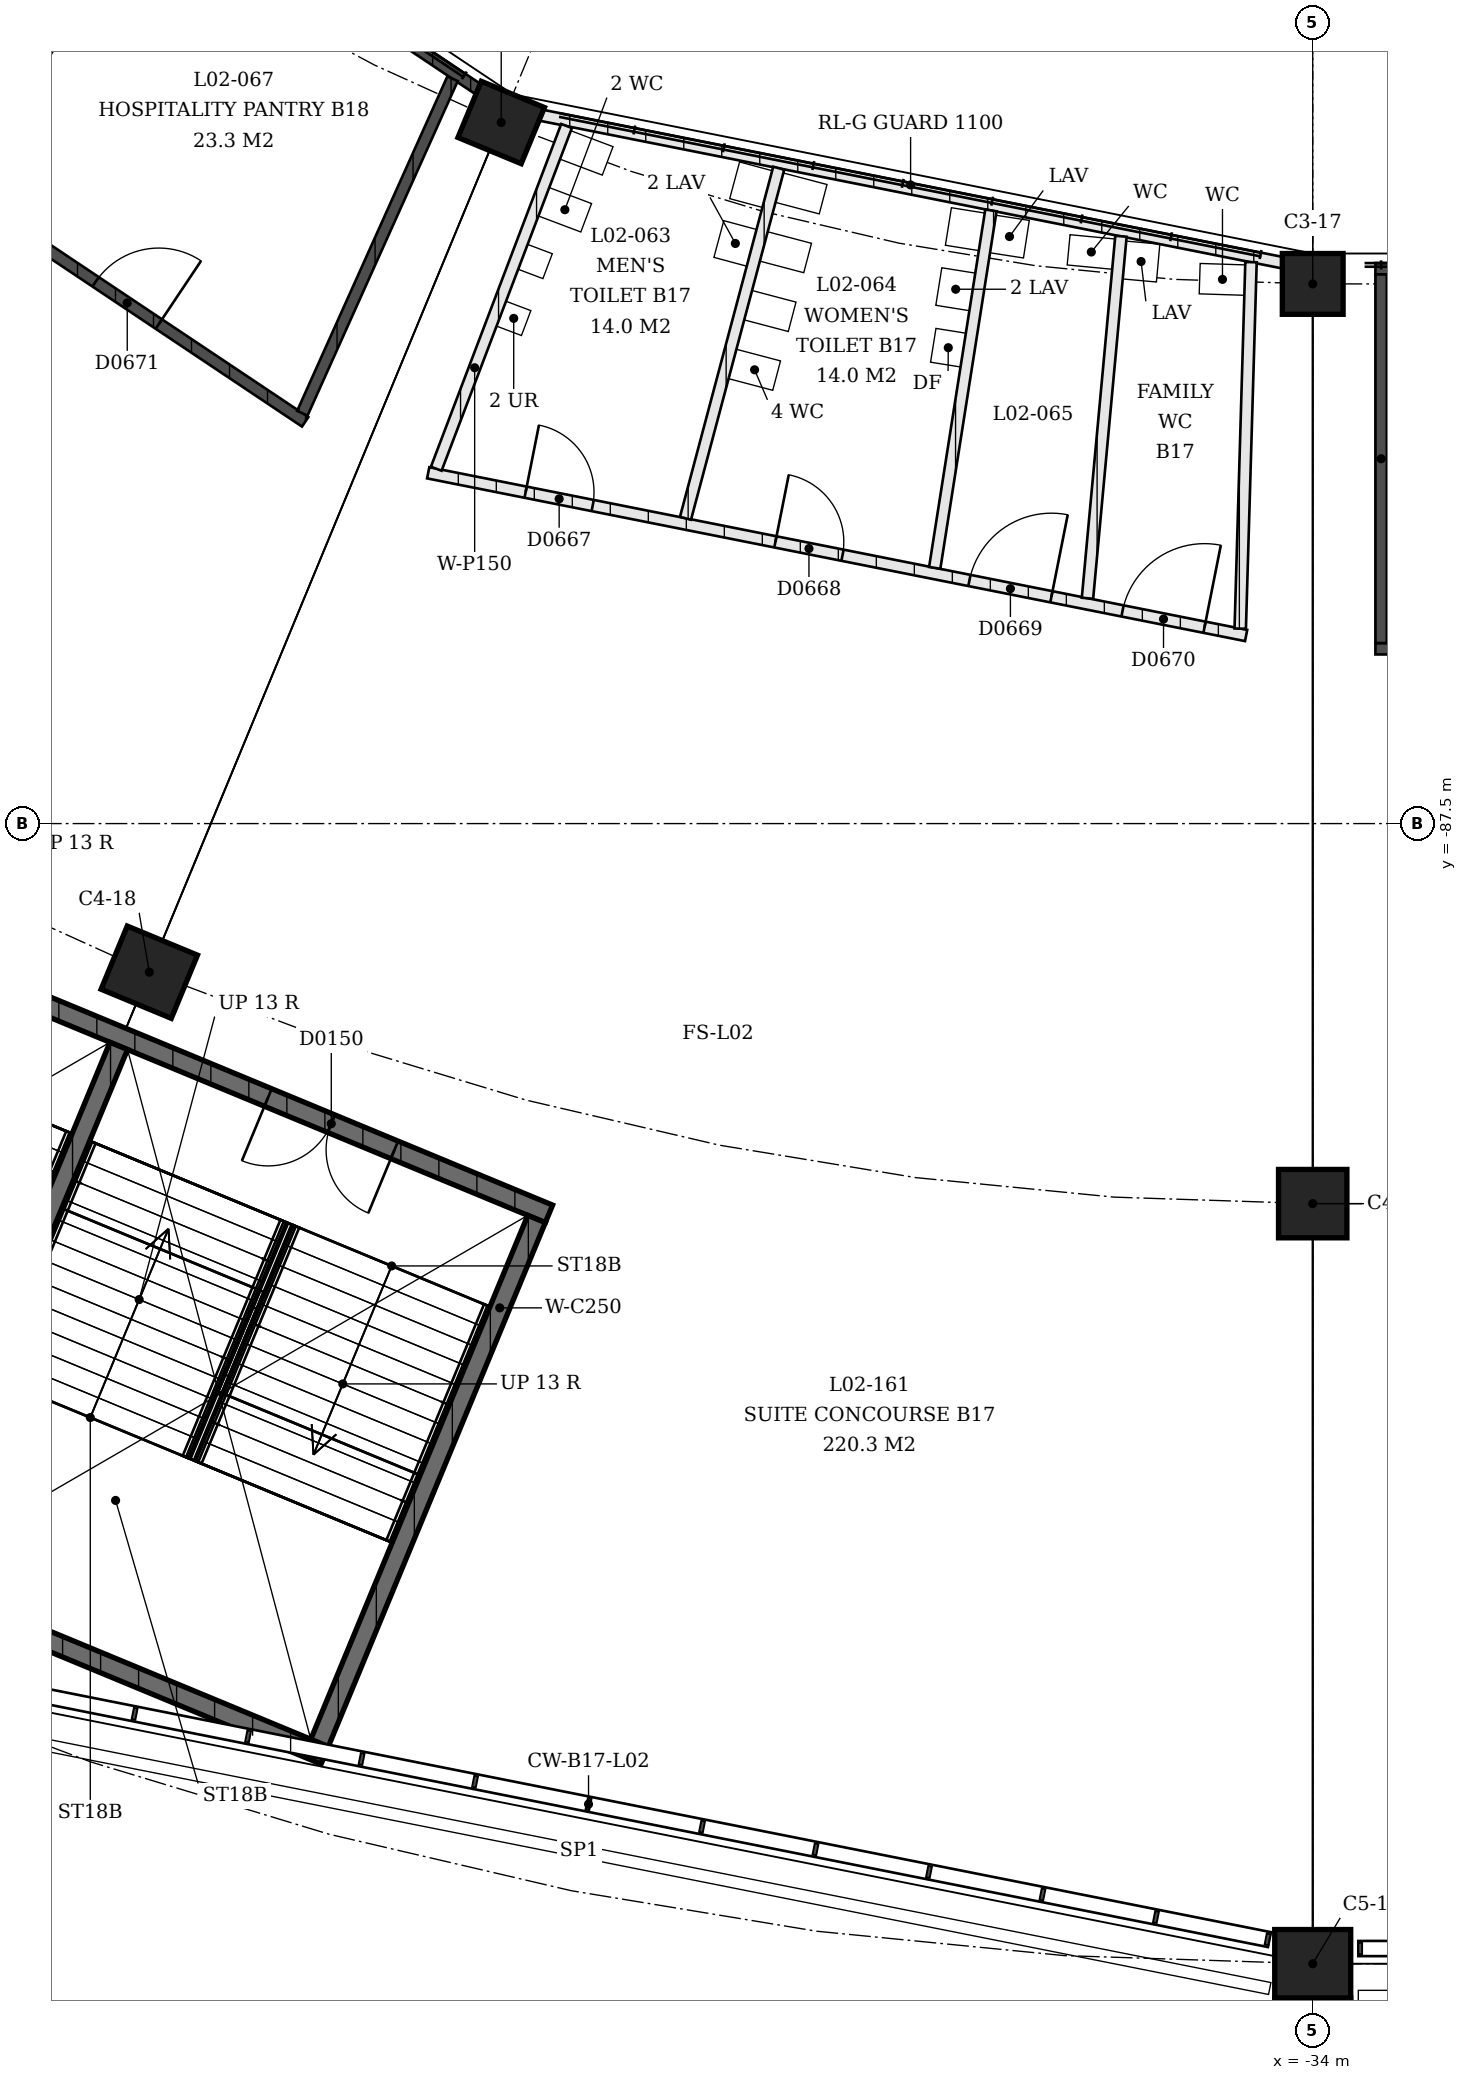
"""IFC4 building model, lengths in metres.
Left out: names, types, materials, properties, quantities, classifications, styles, units other than length and angle.
Written with IfcOpenShell. Run it as: python <this file> out.ifc"""

import sys

from ifc_helpers import new_model, si_unit, direction, frame, frame_2d, origin, origin_2d, place, context, subcontext, project, spatial, rectangle, extrude, element, fill, save


model = new_model("IFC4")
c1 = context("Model", 3, precision=1e-05, world=origin(), true_north=direction((0.0, 1.0)))
c2 = subcontext(c1, "Body", "Model", "MODEL_VIEW")
j1 = project(units=[si_unit("LENGTHUNIT", "METRE"), si_unit("PLANEANGLEUNIT", "RADIAN")], contexts=[c1])
p1 = place(None, origin())
s1 = spatial("IfcSite", under=j1, at=p1, CompositionType="ELEMENT")
p2 = place(p1, origin())
s2 = spatial("IfcBuilding", under=s1, at=p2, CompositionType="ELEMENT")
p3 = place(p2, frame((0.0, 0.0, 9.0)))
s3 = spatial("IfcBuildingStorey", under=s2, at=p3, CompositionType="ELEMENT", Elevation=9.0)
p4 = place(p3, frame((-34.0, -80.4, 0.0), z_axis=(0.0, 0.0, 1.0), x_axis=(1.0, 0.0, 0.0)))
e1 = element("IfcColumn", 1, at=p4, inside=s3, PredefinedType="COLUMN", context=c2, shape_type="SweptSolid", body=[
    extrude(rectangle(XDim=0.8, YDim=0.8, at=origin_2d()), origin(), (0.0, 0.0, 1.0), 4.5),
])
p5 = place(p3, frame((-34.0, -92.5, 0.0), z_axis=(0.0, 0.0, 1.0), x_axis=(1.0, 0.0, 0.0)))
e2 = element("IfcColumn", 2, at=p5, inside=s3, PredefinedType="COLUMN", context=c2, shape_type="SweptSolid", body=[
    extrude(rectangle(XDim=0.9, YDim=0.9, at=origin_2d()), origin(), (0.0, 0.0, 1.0), 4.5),
])
p6 = place(p3, frame((-34.0, -102.5, 0.0), z_axis=(0.0, 0.0, 1.0), x_axis=(1.0, 0.0, 0.0)))
e3 = element("IfcColumn", 3, at=p6, inside=s3, PredefinedType="COLUMN", context=c2, shape_type="SweptSolid", body=[
    extrude(rectangle(XDim=1.0, YDim=0.9, at=origin_2d()), origin(), (0.0, 0.0, 1.0), 4.5),
])
p7 = place(p3, frame((-44.677, -78.276, 0.0), z_axis=(0.0, 0.0, 1.0), x_axis=(0.923879532511, -0.382683432365, 0.0)))
e4 = element("IfcColumn", 4, at=p7, inside=s3, PredefinedType="COLUMN", context=c2, shape_type="SweptSolid", body=[
    extrude(rectangle(XDim=0.9, YDim=0.8, at=origin_2d()), origin(), (0.0, 0.0, 1.0), 4.5),
])
p8 = place(p3, frame((-49.307, -89.455, 0.0), z_axis=(0.0, 0.0, 1.0), x_axis=(0.923879532511, -0.382683432365, 0.0)))
e5 = element("IfcColumn", 5, at=p8, inside=s3, PredefinedType="COLUMN", context=c2, shape_type="SweptSolid", body=[
    extrude(rectangle(XDim=1.0, YDim=0.9, at=origin_2d()), origin(), (0.0, 0.0, 1.0), 4.5),
])
p9 = place(p3, frame((-55.274, -87.985, 0.0), z_axis=(0.0, 0.0, 1.0), x_axis=(0.923877480578, -0.382688386133, 0.0)))
e6 = element("IfcWall", 6, at=p9, inside=s3, PredefinedType="SHEAR", context=c2, shape_type="SweptSolid", body=[
    extrude(rectangle(XDim=12.15, YDim=0.25, at=frame_2d((6.075, 0.0))), origin(), (0.0, 0.0, 1.0), 4.09),
])
p10 = place(p9, frame((2.2, 0.0, 0.0)))
e7 = element("IfcOpeningElement", 7, at=p10, cuts=e6, PredefinedType="OPENING", context=c2, shape_type="SweptSolid", body=[
    extrude(rectangle(XDim=1.8, YDim=2.1, at=frame_2d((0.9, 1.05))), frame((0.0, 0.125, 0.0), z_axis=(0.0, -1.0, 0.0), x_axis=(1.0, 0.0, 0.0)), (0.0, 0.0, 1.0), 0.25),
])
p11 = place(p9, frame((8.15, 0.0, 0.0)))
e8 = element("IfcOpeningElement", 8, at=p11, cuts=e6, PredefinedType="OPENING", context=c2, shape_type="SweptSolid", body=[
    extrude(rectangle(XDim=1.8, YDim=2.1, at=frame_2d((0.9, 1.05))), frame((0.0, 0.125, 0.0), z_axis=(0.0, -1.0, 0.0), x_axis=(1.0, 0.0, 0.0)), (0.0, 0.0, 1.0), 0.25),
])
p12 = place(p3, frame((-58.224, -95.108, 0.0), z_axis=(0.0, 0.0, 1.0), x_axis=(0.923884584817, -0.382671234792, 0.0)))
e9 = element("IfcWall", 9, at=p12, inside=s3, PredefinedType="SHEAR", context=c2, shape_type="SweptSolid", body=[
    extrude(rectangle(XDim=12.15, YDim=0.25, at=frame_2d((6.075, 0.0))), origin(), (0.0, 0.0, 1.0), 4.09),
])
p13 = place(p3, frame((-44.212, -92.702, 0.0), z_axis=(0.0, 0.0, 1.0), x_axis=(-0.382664910245, -0.923887204407, 0.0)))
e10 = element("IfcWall", 10, at=p13, inside=s3, PredefinedType="SHEAR", context=c2, shape_type="SweptSolid", body=[
    extrude(rectangle(XDim=7.46, YDim=0.25, at=frame_2d((3.73, 0.0))), origin(), (0.0, 0.0, 1.0), 4.09),
])
p14 = place(p3, frame((-49.709, -90.425, 0.0), z_axis=(0.0, 0.0, 1.0), x_axis=(-0.382676480483, -0.923882412044, 0.0)))
e11 = element("IfcWall", 11, at=p14, inside=s3, PredefinedType="SHEAR", context=c2, shape_type="SweptSolid", body=[
    extrude(rectangle(XDim=7.46, YDim=0.25, at=frame_2d((3.73, 0.0))), origin(), (0.0, 0.0, 1.0), 4.09),
])
p15 = place(p3, frame((-20.9, -80.2, 0.0), z_axis=(0.0, 0.0, 1.0), x_axis=(-1.0, 0.0, 0.0)))
e12 = element("IfcWall", 12, at=p15, inside=s3, PredefinedType="SOLIDWALL", context=c2, shape_type="SweptSolid", body=[
    extrude(rectangle(XDim=12.275, YDim=0.15, at=frame_2d((6.138, 0.0))), origin(), (0.0, 0.0, 1.0), 3.0),
])
p16 = place(p3, frame((-21.225, -85.2, 0.0), z_axis=(0.0, 0.0, 1.0), x_axis=(-1.0, 0.0, 0.0)))
e13 = element("IfcWall", 13, at=p16, inside=s3, PredefinedType="SOLIDWALL", context=c2, shape_type="SweptSolid", body=[
    extrude(rectangle(XDim=11.95, YDim=0.15, at=frame_2d((5.975, 0.0))), origin(), (0.0, 0.0, 1.0), 3.0),
])
p17 = place(p16, frame((2.525, 0.0, 0.0)))
e14 = element("IfcOpeningElement", 14, at=p17, cuts=e13, PredefinedType="OPENING", context=c2, shape_type="SweptSolid", body=[
    extrude(rectangle(XDim=1.0, YDim=2.1, at=frame_2d((0.5, 1.05))), frame((0.0, 0.075, 0.0), z_axis=(0.0, -1.0, 0.0), x_axis=(1.0, 0.0, 0.0)), (0.0, 0.0, 1.0), 0.15),
])
p18 = place(p16, frame((8.425, 0.0, 0.0)))
e15 = element("IfcOpeningElement", 15, at=p18, cuts=e13, PredefinedType="OPENING", context=c2, shape_type="SweptSolid", body=[
    extrude(rectangle(XDim=1.0, YDim=2.1, at=frame_2d((0.5, 1.05))), frame((0.0, 0.075, 0.0), z_axis=(0.0, -1.0, 0.0), x_axis=(1.0, 0.0, 0.0)), (0.0, 0.0, 1.0), 0.15),
])
p19 = place(p3, frame((-33.1, -80.275, 0.0), z_axis=(0.0, 0.0, 1.0), x_axis=(0.0, -1.0, 0.0)))
e16 = element("IfcWall", 16, at=p19, inside=s3, PredefinedType="SOLIDWALL", context=c2, shape_type="SweptSolid", body=[
    extrude(rectangle(XDim=4.85, YDim=0.15, at=frame_2d((2.425, 0.0))), origin(), (0.0, 0.0, 1.0), 3.0),
])
p20 = place(p3, frame((-44.15, -78.181, 0.0), z_axis=(0.0, 0.0, 1.0), x_axis=(0.980786042223, -0.195086492048, 0.0)))
e17 = element("IfcWall", 17, at=p20, inside=s3, PredefinedType="PARTITIONING", context=c2, shape_type="SweptSolid", body=[
    extrude(rectangle(XDim=9.941, YDim=0.15, at=frame_2d((4.971, 0.0))), origin(), (0.0, 0.0, 1.0), 3.0),
])
p21 = place(p3, frame((-45.638, -82.885, 0.0), z_axis=(0.0, 0.0, 1.0), x_axis=(0.980788934186, -0.195071952313, 0.0)))
e18 = element("IfcWall", 18, at=p21, inside=s3, PredefinedType="PARTITIONING", context=c2, shape_type="SweptSolid", body=[
    extrude(rectangle(XDim=10.972, YDim=0.15, at=frame_2d((5.486, 0.0))), origin(), (0.0, 0.0, 1.0), 3.0),
])
p22 = place(p21, frame((1.307, 0.0, 0.0)))
e19 = element("IfcOpeningElement", 19, at=p22, cuts=e18, PredefinedType="OPENING", context=c2, shape_type="SweptSolid", body=[
    extrude(rectangle(XDim=0.9, YDim=2.1, at=frame_2d((0.45, 1.05))), frame((0.0, 0.075, 0.0), z_axis=(0.0, -1.0, 0.0), x_axis=(1.0, 0.0, 0.0)), (0.0, 0.0, 1.0), 0.15),
])
p23 = place(p21, frame((4.658, 0.0, 0.0)))
e20 = element("IfcOpeningElement", 20, at=p23, cuts=e18, PredefinedType="OPENING", context=c2, shape_type="SweptSolid", body=[
    extrude(rectangle(XDim=0.9, YDim=2.1, at=frame_2d((0.45, 1.05))), frame((0.0, 0.075, 0.0), z_axis=(0.0, -1.0, 0.0), x_axis=(1.0, 0.0, 0.0)), (0.0, 0.0, 1.0), 0.15),
])
p24 = place(p21, frame((7.26, 0.0, 0.0)))
e21 = element("IfcOpeningElement", 21, at=p24, cuts=e18, PredefinedType="OPENING", context=c2, shape_type="SweptSolid", body=[
    extrude(rectangle(XDim=1.1, YDim=2.1, at=frame_2d((0.55, 1.05))), frame((0.0, 0.075, 0.0), z_axis=(0.0, -1.0, 0.0), x_axis=(1.0, 0.0, 0.0)), (0.0, 0.0, 1.0), 0.15),
])
p25 = place(p21, frame((9.314, 0.0, 0.0)))
e22 = element("IfcOpeningElement", 22, at=p25, cuts=e18, PredefinedType="OPENING", context=c2, shape_type="SweptSolid", body=[
    extrude(rectangle(XDim=1.1, YDim=2.1, at=frame_2d((0.55, 1.05))), frame((0.0, 0.075, 0.0), z_axis=(0.0, -1.0, 0.0), x_axis=(1.0, 0.0, 0.0)), (0.0, 0.0, 1.0), 0.15),
])
p26 = place(p3, frame((-43.817, -78.322, 0.0), z_axis=(0.0, 0.0, 1.0), x_axis=(-0.35538492255, -0.934720041951, 0.0)))
e23 = element("IfcWall", 23, at=p26, inside=s3, PredefinedType="PARTITIONING", context=c2, shape_type="SweptSolid", body=[
    extrude(rectangle(XDim=4.824, YDim=0.15, at=frame_2d((2.412, 0.0))), origin(), (0.0, 0.0, 1.0), 3.0),
])
p27 = place(p3, frame((-41.026, -78.877, 0.0), z_axis=(0.0, 0.0, 1.0), x_axis=(-0.257378912157, -0.966310558556, 0.0)))
e24 = element("IfcWall", 24, at=p27, inside=s3, PredefinedType="PARTITIONING", context=c2, shape_type="SweptSolid", body=[
    extrude(rectangle(XDim=4.767, YDim=0.15, at=frame_2d((2.383, 0.0))), origin(), (0.0, 0.0, 1.0), 3.0),
])
p28 = place(p3, frame((-38.234, -79.433, 0.0), z_axis=(0.0, 0.0, 1.0), x_axis=(-0.155285736325, -0.987869596705, 0.0)))
e25 = element("IfcWall", 25, at=p28, inside=s3, PredefinedType="PARTITIONING", context=c2, shape_type="SweptSolid", body=[
    extrude(rectangle(XDim=4.761, YDim=0.15, at=frame_2d((2.38, 0.0))), origin(), (0.0, 0.0, 1.0), 3.0),
])
p29 = place(p3, frame((-36.523, -79.773, 0.0), z_axis=(0.0, 0.0, 1.0), x_axis=(-0.09208667632, -0.995750995, 0.0)))
e26 = element("IfcWall", 26, at=p29, inside=s3, PredefinedType="PARTITIONING", context=c2, shape_type="SweptSolid", body=[
    extrude(rectangle(XDim=4.783, YDim=0.15, at=frame_2d((2.391, 0.0))), origin(), (0.0, 0.0, 1.0), 3.0),
])
p30 = place(p3, frame((-34.812, -80.114, 0.0), z_axis=(0.0, 0.0, 1.0), x_axis=(-0.029405000692, -0.999567579473, 0.0)))
e27 = element("IfcWall", 27, at=p30, inside=s3, PredefinedType="PARTITIONING", context=c2, shape_type="SweptSolid", body=[
    extrude(rectangle(XDim=4.824, YDim=0.15, at=frame_2d((2.412, 0.0))), origin(), (0.0, 0.0, 1.0), 3.0),
])
p31 = place(p3, frame((-44.982, -77.837, 0.0), z_axis=(0.0, 0.0, 1.0), x_axis=(-0.831461186136, 0.555582843463, 0.0)))
e28 = element("IfcWall", 28, at=p31, inside=s3, PredefinedType="SOLIDWALL", context=c2, shape_type="SweptSolid", body=[
    extrude(rectangle(XDim=9.89, YDim=0.15, at=frame_2d((4.945, 0.0))), origin(), (0.0, 0.0, 1.0), 3.0),
])
p32 = place(p3, frame((-47.257, -82.215, 0.0), z_axis=(0.0, 0.0, 1.0), x_axis=(-0.831471162003, 0.555567913722, 0.0)))
e29 = element("IfcWall", 29, at=p32, inside=s3, PredefinedType="SOLIDWALL", context=c2, shape_type="SweptSolid", body=[
    extrude(rectangle(XDim=11.099, YDim=0.15, at=frame_2d((5.55, 0.0))), origin(), (0.0, 0.0, 1.0), 3.0),
])
p33 = place(p32, frame((2.315, 0.0, 0.0)))
e30 = element("IfcOpeningElement", 30, at=p33, cuts=e29, PredefinedType="OPENING", context=c2, shape_type="SweptSolid", body=[
    extrude(rectangle(XDim=1.0, YDim=2.1, at=frame_2d((0.5, 1.05))), frame((0.0, 0.075, 0.0), z_axis=(0.0, -1.0, 0.0), x_axis=(1.0, 0.0, 0.0)), (0.0, 0.0, 1.0), 0.15),
])
p34 = place(p32, frame((7.784, 0.0, 0.0)))
e31 = element("IfcOpeningElement", 31, at=p34, cuts=e29, PredefinedType="OPENING", context=c2, shape_type="SweptSolid", body=[
    extrude(rectangle(XDim=1.0, YDim=2.1, at=frame_2d((0.5, 1.05))), frame((0.0, 0.075, 0.0), z_axis=(0.0, -1.0, 0.0), x_axis=(1.0, 0.0, 0.0)), (0.0, 0.0, 1.0), 0.15),
])
p35 = place(p3, frame((-45.317, -77.701, 0.0), z_axis=(0.0, 0.0, 1.0), x_axis=(-0.409657452305, -0.912239426779, 0.0)))
e32 = element("IfcWall", 32, at=p35, inside=s3, PredefinedType="SOLIDWALL", context=c2, shape_type="SweptSolid", body=[
    extrude(rectangle(XDim=4.824, YDim=0.15, at=frame_2d((2.412, 0.0))), origin(), (0.0, 0.0, 1.0), 3.0),
])
p36 = place(p3, frame((-49.179, -75.12, 0.0), z_axis=(0.0, 0.0, 1.0), x_axis=(-0.557220399255, -0.830364634756, 0.0)))
e33 = element("IfcWall", 33, at=p36, inside=s3, PredefinedType="SOLIDWALL", context=c2, shape_type="SweptSolid", body=[
    extrude(rectangle(XDim=4.757, YDim=0.15, at=frame_2d((2.378, 0.0))), origin(), (0.0, 0.0, 1.0), 3.0),
])
p37 = place(p11, origin())
e34 = element("IfcDoor", 34, at=p37, inside=s3, OperationType="DOUBLE_DOOR_SINGLE_SWING", PredefinedType="DOOR", context=c2, shape_type="SweptSolid", body=[
    extrude(rectangle(XDim=1.8, YDim=2.1, at=frame_2d((0.9, 1.05))), frame((0.0, 0.025, 0.0), z_axis=(0.0, -1.0, 0.0), x_axis=(1.0, 0.0, 0.0)), (0.0, 0.0, 1.0), 0.05),
])
fill(e8, e34)
p38 = place(p22, origin())
e35 = element("IfcDoor", 35, at=p38, inside=s3, OperationType="SINGLE_SWING_RIGHT", PredefinedType="DOOR", context=c2, shape_type="SweptSolid", body=[
    extrude(rectangle(XDim=0.9, YDim=2.1, at=frame_2d((0.45, 1.05))), frame((0.0, 0.025, 0.0), z_axis=(0.0, -1.0, 0.0), x_axis=(1.0, 0.0, 0.0)), (0.0, 0.0, 1.0), 0.05),
])
fill(e19, e35)
p39 = place(p23, origin())
e36 = element("IfcDoor", 36, at=p39, inside=s3, OperationType="SINGLE_SWING_RIGHT", PredefinedType="DOOR", context=c2, shape_type="SweptSolid", body=[
    extrude(rectangle(XDim=0.9, YDim=2.1, at=frame_2d((0.45, 1.05))), frame((0.0, 0.025, 0.0), z_axis=(0.0, -1.0, 0.0), x_axis=(1.0, 0.0, 0.0)), (0.0, 0.0, 1.0), 0.05),
])
fill(e20, e36)
p40 = place(p24, origin())
e37 = element("IfcDoor", 37, at=p40, inside=s3, OperationType="SINGLE_SWING_LEFT", PredefinedType="DOOR", context=c2, shape_type="SweptSolid", body=[
    extrude(rectangle(XDim=1.1, YDim=2.1, at=frame_2d((0.55, 1.05))), frame((0.0, 0.025, 0.0), z_axis=(0.0, -1.0, 0.0), x_axis=(1.0, 0.0, 0.0)), (0.0, 0.0, 1.0), 0.05),
])
fill(e21, e37)
p41 = place(p25, origin())
e38 = element("IfcDoor", 38, at=p41, inside=s3, OperationType="SINGLE_SWING_LEFT", PredefinedType="DOOR", context=c2, shape_type="SweptSolid", body=[
    extrude(rectangle(XDim=1.1, YDim=2.1, at=frame_2d((0.55, 1.05))), frame((0.0, 0.025, 0.0), z_axis=(0.0, -1.0, 0.0), x_axis=(1.0, 0.0, 0.0)), (0.0, 0.0, 1.0), 0.05),
])
fill(e22, e38)
p42 = place(p33, origin())
e39 = element("IfcDoor", 39, at=p42, inside=s3, OperationType="SINGLE_SWING_LEFT", PredefinedType="DOOR", context=c2, shape_type="SweptSolid", body=[
    extrude(rectangle(XDim=1.0, YDim=2.1, at=frame_2d((0.5, 1.05))), frame((0.0, 0.025, 0.0), z_axis=(0.0, -1.0, 0.0), x_axis=(1.0, 0.0, 0.0)), (0.0, 0.0, 1.0), 0.05),
])
fill(e30, e39)
save(model, sys.argv[1])
